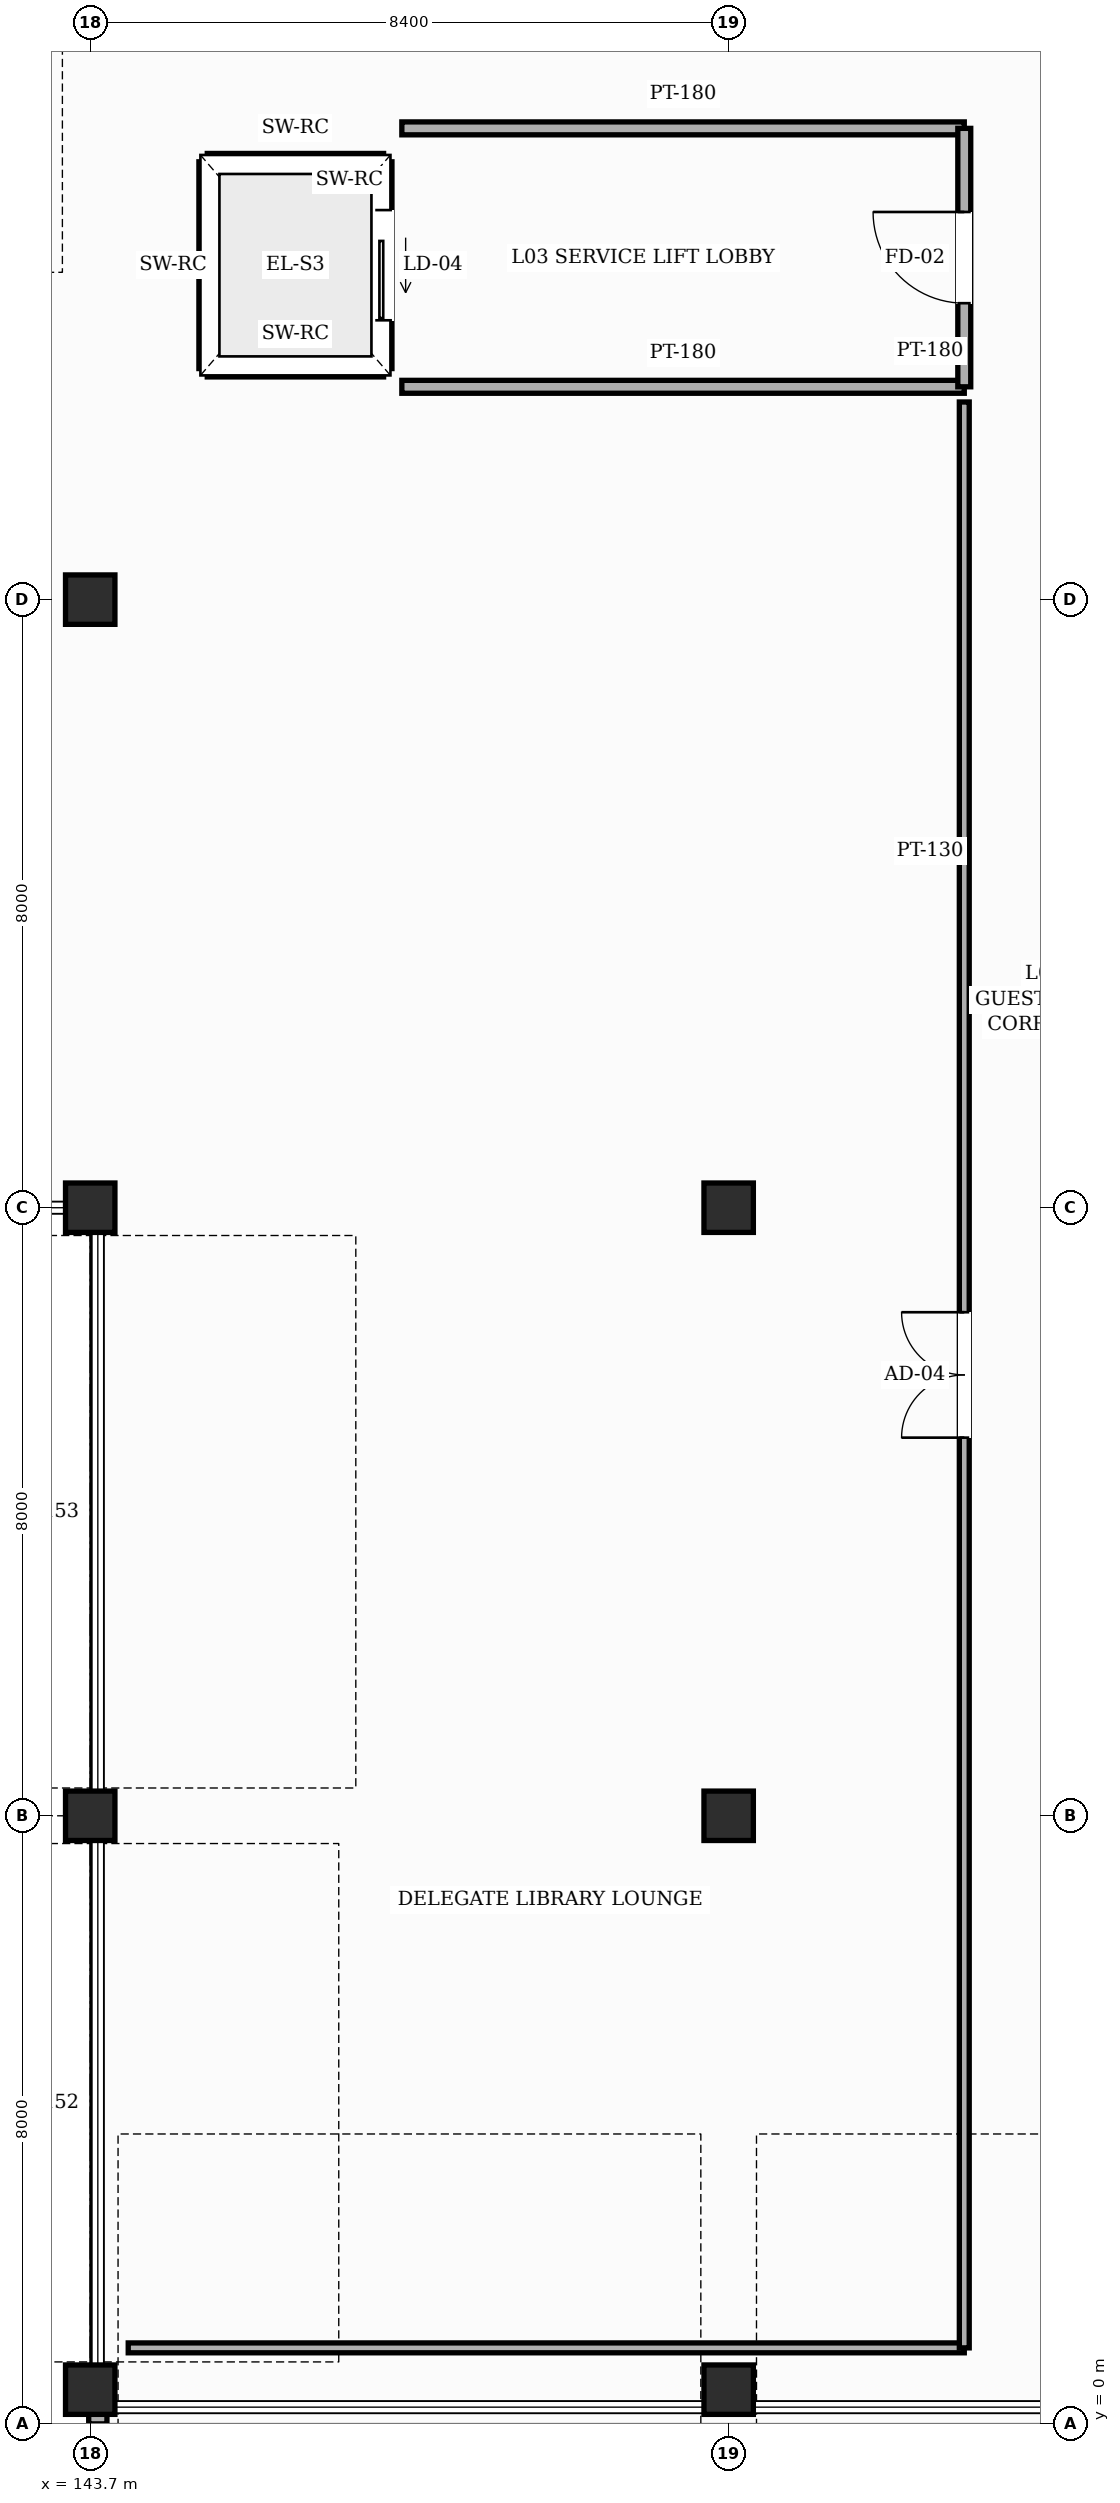
"""IFC4 building model, lengths in metres.
Left out: names, types, materials, properties, quantities, classifications, styles, units other than length and angle.
Written with IfcOpenShell. Run it as: python <this file> out.ifc"""

import sys

from ifc_helpers import new_model, si_unit, direction, frame, frame_2d, origin, origin_2d, place, context, subcontext, project, spatial, rectangle, hollow_rectangle, extrude, element, fill, save


model = new_model("IFC4")
c1 = context("Model", 3, precision=1e-05, world=origin(), true_north=direction((0.0, 1.0)))
c2 = subcontext(c1, "Body", "Model", "MODEL_VIEW")
j1 = project(units=[si_unit("LENGTHUNIT", "METRE"), si_unit("PLANEANGLEUNIT", "RADIAN")], contexts=[c1])
p1 = place(None, origin())
s1 = spatial("IfcSite", under=j1, at=p1, CompositionType="ELEMENT")
p2 = place(p1, origin())
s2 = spatial("IfcBuilding", under=s1, at=p2, CompositionType="ELEMENT")
p3 = place(p2, frame((0.0, 0.0, 15.0)))
s3 = spatial("IfcBuildingStorey", under=s2, at=p3, CompositionType="ELEMENT", Elevation=15.0)
for number, where, z_axis, x_axis in (
    (1, (143.7, 0.45, 0.0), (0.0, 0.0, 1.0), (1.0, 0.0, 0.0)),
    (2, (143.7, 8.0, 0.0), (0.0, 0.0, 1.0), (1.0, 0.0, 0.0)),
    (3, (143.7, 16.0, 0.0), (0.0, 0.0, 1.0), (1.0, 0.0, 0.0)),
    (4, (143.7, 24.0, 0.0), (0.0, 0.0, 1.0), (1.0, 0.0, 0.0)),
    (5, (152.1, 0.45, 0.0), (0.0, 0.0, 1.0), (1.0, 0.0, 0.0)),
    (6, (152.1, 8.0, 0.0), (0.0, 0.0, 1.0), (1.0, 0.0, 0.0)),
    (7, (152.1, 16.0, 0.0), (0.0, 0.0, 1.0), (1.0, 0.0, 0.0)),
):
    element("IfcColumn", number, at=place(p3, frame(where, z_axis=z_axis, x_axis=x_axis)), inside=s3, PredefinedType="COLUMN", context=c2, shape_type="SweptSolid", body=[
        extrude(hollow_rectangle(XDim=0.65, YDim=0.65, WallThickness=0.025, InnerFilletRadius=0.025, OuterFilletRadius=0.05, at=origin_2d()), origin(), (0.0, 0.0, 1.0), 4.8),
    ])
p4 = place(p3, frame((143.8, 0.0, 0.0), z_axis=(0.0, 0.0, 1.0), x_axis=(0.0, 1.0, 0.0)))
e8 = element("IfcWall", 8, at=p4, inside=s3, PredefinedType="SOLIDWALL", context=c2, shape_type="SweptSolid", body=[
    extrude(rectangle(XDim=0.36, YDim=0.24, at=frame_2d((0.18, 0.0))), origin(), (0.0, 0.0, 1.0), 4.545),
])
for number, where, z_axis, x_axis in (
    (9, (145.24, 29.76, 0.0), (0.0, 0.0, 1.0), (1.0, 0.0, 0.0)),
    (10, (145.24, 27.04, 0.0), (0.0, 0.0, 1.0), (1.0, 0.0, 0.0)),
):
    element("IfcWall", number, at=place(p3, frame(where, z_axis=z_axis, x_axis=x_axis)), inside=s3, PredefinedType="SHEAR", context=c2, shape_type="SweptSolid", body=[
        extrude(rectangle(XDim=2.32, YDim=0.22, at=frame_2d((1.16, 0.0))), origin(), (0.0, 0.0, 1.0), 4.56),
    ])
p5 = place(p3, frame((147.56, 27.04, 0.0), z_axis=(0.0, 0.0, 1.0), x_axis=(0.0, 1.0, 0.0)))
e11 = element("IfcWall", 11, at=p5, inside=s3, PredefinedType="SHEAR", context=c2, shape_type="SweptSolid", body=[
    extrude(rectangle(XDim=2.72, YDim=0.22, at=frame_2d((1.36, 0.0))), origin(), (0.0, 0.0, 1.0), 4.56),
])
p6 = place(p5, frame((0.635, 0.0, 0.0)))
e12 = element("IfcOpeningElement", 12, at=p6, cuts=e11, PredefinedType="OPENING", context=c2, shape_type="SweptSolid", body=[
    extrude(rectangle(XDim=1.45, YDim=2.35, at=frame_2d((0.725, 1.175))), frame((0.0, 0.12, 0.0), z_axis=(0.0, -1.0, 0.0), x_axis=(1.0, 0.0, 0.0)), (0.0, 0.0, 1.0), 0.24),
])
p7 = place(p3, frame((145.24, 27.04, 0.0), z_axis=(0.0, 0.0, 1.0), x_axis=(0.0, 1.0, 0.0)))
e13 = element("IfcWall", 13, at=p7, inside=s3, PredefinedType="SHEAR", context=c2, shape_type="SweptSolid", body=[
    extrude(rectangle(XDim=2.72, YDim=0.22, at=frame_2d((1.36, 0.0))), origin(), (0.0, 0.0, 1.0), 4.56),
])
p8 = place(p3, frame((144.2, 1.0, 0.0), z_axis=(0.0, 0.0, 1.0), x_axis=(1.0, 0.0, 0.0)))
e14 = element("IfcWall", 14, at=p8, inside=s3, PredefinedType="PARTITIONING", context=c2, shape_type="SweptSolid", body=[
    extrude(rectangle(XDim=11.0, YDim=0.13, at=frame_2d((5.5, 0.0))), origin(), (0.0, 0.0, 1.0), 4.545),
])
for number, where, z_axis, x_axis in (
    (15, (147.8, 26.8, 0.0), (0.0, 0.0, 1.0), (1.0, 0.0, 0.0)),
    (16, (147.8, 30.2, 0.0), (0.0, 0.0, 1.0), (1.0, 0.0, 0.0)),
):
    element("IfcWall", number, at=place(p3, frame(where, z_axis=z_axis, x_axis=x_axis)), inside=s3, PredefinedType="PARTITIONING", context=c2, shape_type="SweptSolid", body=[
        extrude(rectangle(XDim=7.4, YDim=0.17, at=frame_2d((3.7, 0.0))), origin(), (0.0, 0.0, 1.0), 4.545),
    ])
p9 = place(p3, frame((155.2, 1.0, 0.0), z_axis=(0.0, 0.0, 1.0), x_axis=(0.0, 1.0, 0.0)))
e17 = element("IfcWall", 17, at=p9, inside=s3, PredefinedType="PARTITIONING", context=c2, shape_type="SweptSolid", body=[
    extrude(rectangle(XDim=25.6, YDim=0.13, at=frame_2d((12.8, 0.0))), origin(), (0.0, 0.0, 1.0), 4.545),
])
p10 = place(p9, frame((11.975, 0.0, 0.0)))
e18 = element("IfcOpeningElement", 18, at=p10, cuts=e17, PredefinedType="OPENING", context=c2, shape_type="SweptSolid", body=[
    extrude(rectangle(XDim=1.65, YDim=2.35, at=frame_2d((0.825, 1.175))), frame((0.0, 0.075, 0.0), z_axis=(0.0, -1.0, 0.0), x_axis=(1.0, 0.0, 0.0)), (0.0, 0.0, 1.0), 0.15),
])
p11 = place(p3, frame((155.2, 26.8, 0.0), z_axis=(0.0, 0.0, 1.0), x_axis=(0.0, 1.0, 0.0)))
e19 = element("IfcWall", 19, at=p11, inside=s3, PredefinedType="PARTITIONING", context=c2, shape_type="SweptSolid", body=[
    extrude(rectangle(XDim=3.4, YDim=0.17, at=frame_2d((1.7, 0.0))), origin(), (0.0, 0.0, 1.0), 4.545),
])
p12 = place(p11, frame((1.1, 0.0, 0.0)))
e20 = element("IfcOpeningElement", 20, at=p12, cuts=e19, PredefinedType="OPENING", context=c2, shape_type="SweptSolid", body=[
    extrude(rectangle(XDim=1.2, YDim=2.2, at=frame_2d((0.6, 1.1))), frame((0.0, 0.095, 0.0), z_axis=(0.0, -1.0, 0.0), x_axis=(1.0, 0.0, 0.0)), (0.0, 0.0, 1.0), 0.19),
])
p13 = place(p6, origin())
e21 = element("IfcDoor", 21, at=p13, inside=s3, OperationType="SLIDING_TO_LEFT", PredefinedType="DOOR", context=c2, shape_type="SweptSolid", body=[
    extrude(rectangle(XDim=1.45, YDim=2.35, at=frame_2d((0.725, 1.175))), frame((0.0, 0.025, 0.0), z_axis=(0.0, -1.0, 0.0), x_axis=(1.0, 0.0, 0.0)), (0.0, 0.0, 1.0), 0.05),
])
fill(e12, e21)
p14 = place(p12, origin())
e22 = element("IfcDoor", 22, at=p14, inside=s3, OperationType="SINGLE_SWING_RIGHT", PredefinedType="DOOR", context=c2, shape_type="SweptSolid", body=[
    extrude(rectangle(XDim=1.2, YDim=2.2, at=frame_2d((0.6, 1.1))), frame((0.0, 0.025, 0.0), z_axis=(0.0, -1.0, 0.0), x_axis=(1.0, 0.0, 0.0)), (0.0, 0.0, 1.0), 0.05),
])
fill(e20, e22)
p15 = place(p10, origin())
e23 = element("IfcDoor", 23, at=p15, inside=s3, OperationType="DOUBLE_DOOR_SINGLE_SWING", PredefinedType="DOOR", context=c2, shape_type="SweptSolid", body=[
    extrude(rectangle(XDim=1.65, YDim=2.35, at=frame_2d((0.825, 1.175))), frame((0.0, 0.025, 0.0), z_axis=(0.0, -1.0, 0.0), x_axis=(1.0, 0.0, 0.0)), (0.0, 0.0, 1.0), 0.05),
])
fill(e18, e23)
save(model, sys.argv[1])
